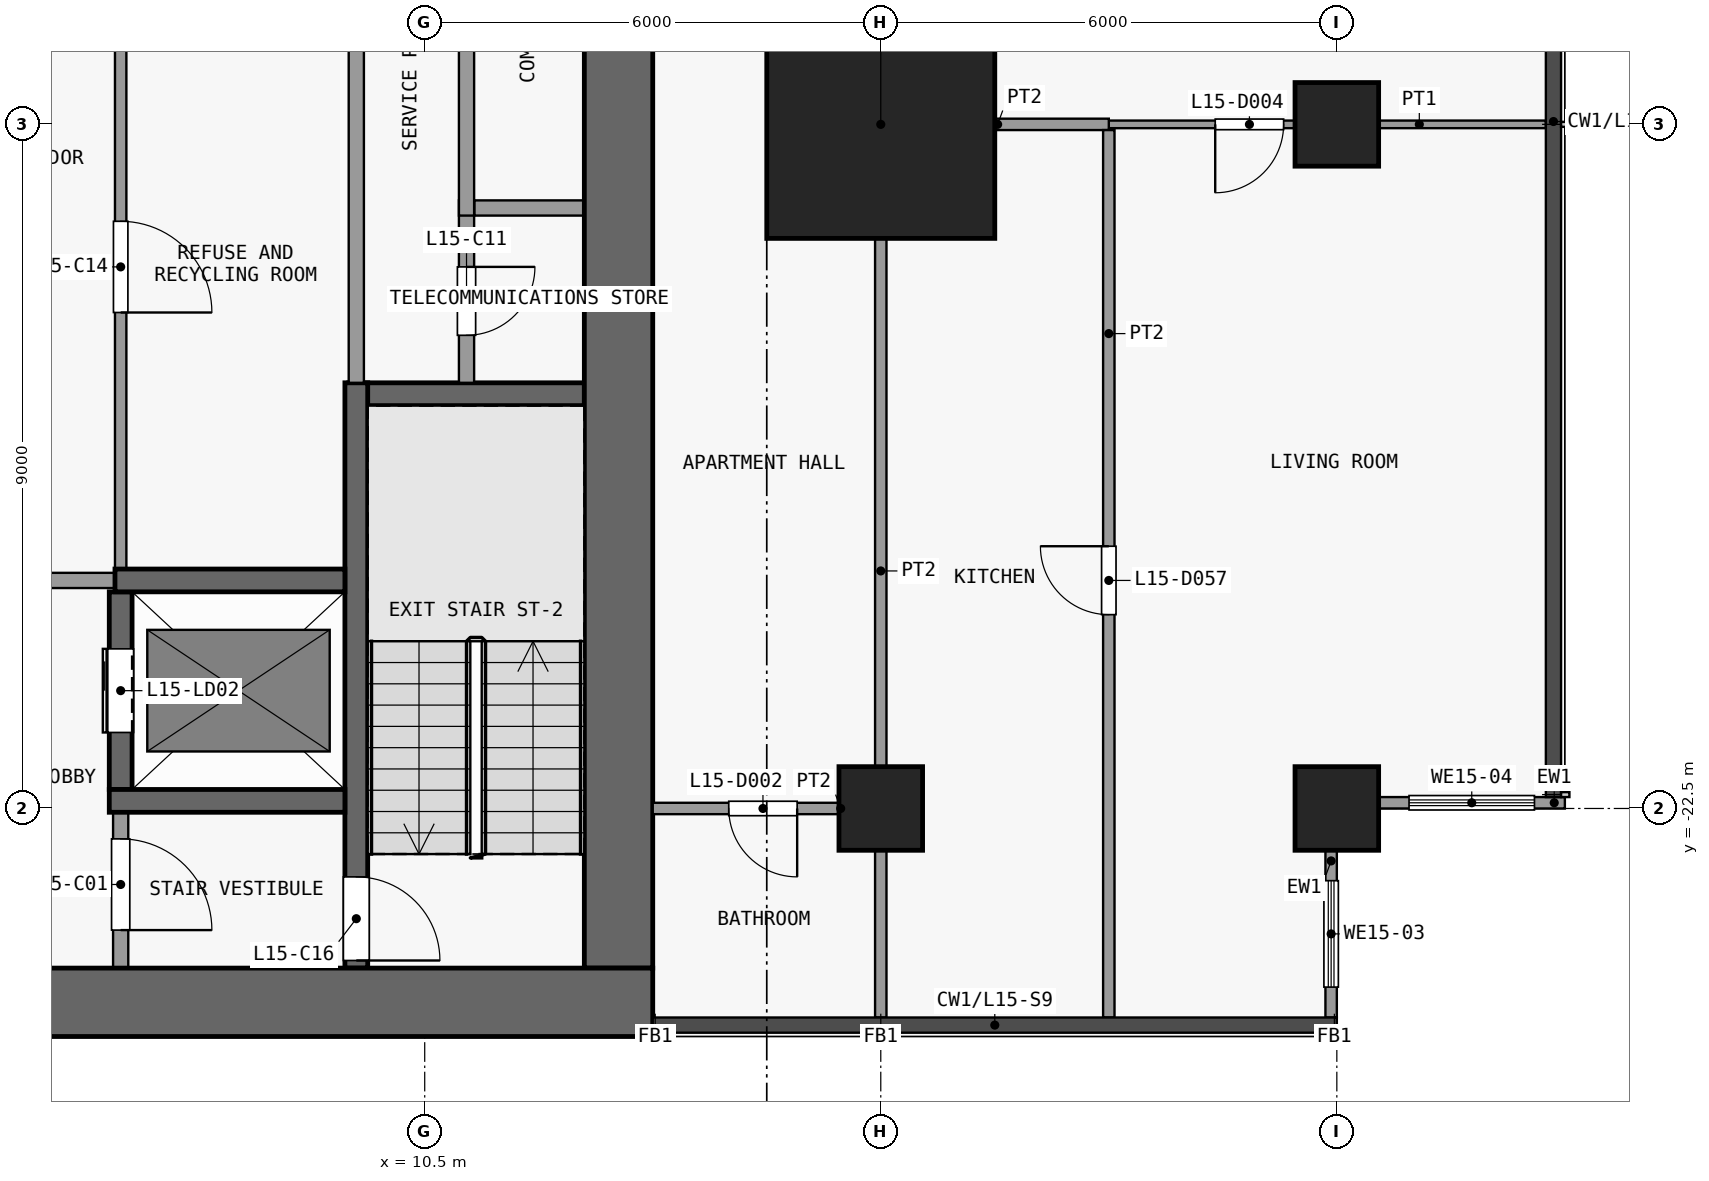
"""IFC4 building model, lengths in metres.
Left out: names, types, materials, properties, quantities, classifications, styles, units other than length and angle.
Written with IfcOpenShell. Run it as: python <this file> out.ifc"""

import sys

from ifc_helpers import new_model, si_unit, direction, frame, frame_2d, origin, origin_2d, place, context, subcontext, project, spatial, rectangle, extrude, element, fill, save


model = new_model("IFC4")
c1 = context("Model", 3, precision=1e-05, world=origin(), true_north=direction((0.0, 1.0)))
c2 = subcontext(c1, "Body", "Model", "MODEL_VIEW")
j1 = project(units=[si_unit("LENGTHUNIT", "METRE"), si_unit("PLANEANGLEUNIT", "RADIAN")], contexts=[c1])
p1 = place(None, origin())
s1 = spatial("IfcSite", under=j1, at=p1, CompositionType="ELEMENT")
p2 = place(p1, origin())
s2 = spatial("IfcBuilding", under=s1, at=p2, CompositionType="ELEMENT")
p3 = place(p2, frame((0.0, 0.0, 64.9)))
s3 = spatial("IfcBuildingStorey", under=s2, at=p3, CompositionType="ELEMENT", Elevation=64.9)
p4 = place(p3, frame((16.5, -22.5, 0.0), z_axis=(0.0, 0.0, 1.0), x_axis=(1.0, 0.0, 0.0)))
e1 = element("IfcColumn", 1, at=p4, inside=s3, PredefinedType="COLUMN", context=c2, shape_type="SweptSolid", body=[
    extrude(rectangle(XDim=1.1, YDim=1.1, at=origin_2d()), origin(), (0.0, 0.0, 1.0), 3.6),
])
p5 = place(p3, frame((16.5, -13.5, 0.0), z_axis=(0.0, 0.0, 1.0), x_axis=(1.0, 0.0, 0.0)))
e2 = element("IfcColumn", 2, at=p5, inside=s3, PredefinedType="COLUMN", context=c2, shape_type="SweptSolid", body=[
    extrude(rectangle(XDim=3.0, YDim=3.0, at=origin_2d()), origin(), (0.0, 0.0, 1.0), 3.6),
])
for number, where, z_axis, x_axis in (
    (3, (22.5, -22.5, 0.0), (0.0, 0.0, 1.0), (1.0, 0.0, 0.0)),
    (4, (22.5, -13.5, 0.0), (0.0, 0.0, 1.0), (1.0, 0.0, 0.0)),
):
    element("IfcColumn", number, at=place(p3, frame(where, z_axis=z_axis, x_axis=x_axis)), inside=s3, PredefinedType="COLUMN", context=c2, shape_type="SweptSolid", body=[
        extrude(rectangle(XDim=1.1, YDim=1.1, at=origin_2d()), origin(), (0.0, 0.0, 1.0), 3.6),
    ])
p6 = place(p3, frame((-13.5, -25.05, 0.0), z_axis=(0.0, 0.0, 1.0), x_axis=(1.0, 0.0, 0.0)))
e5 = element("IfcWall", 5, at=p6, inside=s3, PredefinedType="SHEAR", context=c2, shape_type="SweptSolid", body=[
    extrude(rectangle(XDim=27.0, YDim=0.9, at=frame_2d((13.5, 0.0))), origin(), (0.0, 0.0, 1.0), 3.3),
])
p7 = place(p3, frame((13.05, -24.6, 0.0), z_axis=(0.0, 0.0, 1.0), x_axis=(0.0, 1.0, 0.0)))
e6 = element("IfcWall", 6, at=p7, inside=s3, PredefinedType="SHEAR", context=c2, shape_type="SweptSolid", body=[
    extrude(rectangle(XDim=16.1, YDim=0.9, at=frame_2d((8.05, 0.0))), origin(), (0.0, 0.0, 1.0), 3.3),
])
p8 = place(p3, frame((6.35, -22.4, 0.0), z_axis=(0.0, 0.0, 1.0), x_axis=(1.0, 0.0, 0.0)))
e7 = element("IfcWall", 7, at=p8, inside=s3, PredefinedType="SHEAR", context=c2, shape_type="SweptSolid", body=[
    extrude(rectangle(XDim=3.1, YDim=0.3, at=frame_2d((1.55, 0.0))), origin(), (0.0, 0.0, 1.0), 3.3),
])
p9 = place(p3, frame((6.575, -19.5, 0.0), z_axis=(0.0, 0.0, 1.0), x_axis=(-1.0, 0.0, 0.0)))
e8 = element("IfcWall", 8, at=p9, inside=s3, PredefinedType="PARTITIONING", context=c2, shape_type="SweptSolid", body=[
    extrude(rectangle(XDim=3.55, YDim=0.2, at=frame_2d((1.775, 0.0))), origin(), (0.0, 0.0, 1.0), 3.3),
])
p10 = place(p9, frame((1.025, 0.0, 0.0)))
e9 = element("IfcOpeningElement", 9, at=p10, cuts=e8, PredefinedType="OPENING", context=c2, shape_type="SweptSolid", body=[
    extrude(rectangle(XDim=1.5, YDim=2.1, at=frame_2d((0.75, 1.05))), frame((0.0, 0.11, 0.0), z_axis=(0.0, -1.0, 0.0), x_axis=(1.0, 0.0, 0.0)), (0.0, 0.0, 1.0), 0.22),
])
p11 = place(p3, frame((6.425, -19.5, 0.0), z_axis=(0.0, 0.0, 1.0), x_axis=(1.0, 0.0, 0.0)))
e10 = element("IfcWall", 10, at=p11, inside=s3, PredefinedType="SHEAR", context=c2, shape_type="SweptSolid", body=[
    extrude(rectangle(XDim=3.025, YDim=0.3, at=frame_2d((1.512, 0.0))), origin(), (0.0, 0.0, 1.0), 3.3),
])
p12 = place(p3, frame((9.5, -17.05, 0.0), z_axis=(0.0, 0.0, 1.0), x_axis=(1.0, 0.0, 0.0)))
e11 = element("IfcWall", 11, at=p12, inside=s3, PredefinedType="SHEAR", context=c2, shape_type="SweptSolid", body=[
    extrude(rectangle(XDim=3.1, YDim=0.3, at=frame_2d((1.55, 0.0))), origin(), (0.0, 0.0, 1.0), 3.3),
])
p13 = place(p3, frame((11.15, -14.6, 0.0), z_axis=(0.0, 0.0, 1.0), x_axis=(1.0, 0.0, 0.0)))
e12 = element("IfcWall", 12, at=p13, inside=s3, PredefinedType="PARTITIONING", context=c2, shape_type="SweptSolid", body=[
    extrude(rectangle(XDim=1.45, YDim=0.2, at=frame_2d((0.725, 0.0))), origin(), (0.0, 0.0, 1.0), 3.3),
])
p14 = place(p3, frame((6.5, -22.55, 0.0), z_axis=(0.0, 0.0, 1.0), x_axis=(0.0, -1.0, 0.0)))
e13 = element("IfcWall", 13, at=p14, inside=s3, PredefinedType="PARTITIONING", context=c2, shape_type="SweptSolid", body=[
    extrude(rectangle(XDim=2.05, YDim=0.2, at=frame_2d((1.025, 0.0))), origin(), (0.0, 0.0, 1.0), 3.3),
])
p15 = place(p14, frame((0.35, 0.0, 0.0)))
e14 = element("IfcOpeningElement", 14, at=p15, cuts=e13, PredefinedType="OPENING", context=c2, shape_type="SweptSolid", body=[
    extrude(rectangle(XDim=1.2, YDim=2.1, at=frame_2d((0.6, 1.05))), frame((0.0, 0.11, 0.0), z_axis=(0.0, -1.0, 0.0), x_axis=(1.0, 0.0, 0.0)), (0.0, 0.0, 1.0), 0.22),
])
p16 = place(p3, frame((6.5, -22.25, 0.0), z_axis=(0.0, 0.0, 1.0), x_axis=(0.0, 1.0, 0.0)))
e15 = element("IfcWall", 15, at=p16, inside=s3, PredefinedType="SHEAR", context=c2, shape_type="SweptSolid", body=[
    extrude(rectangle(XDim=2.6, YDim=0.3, at=frame_2d((1.3, 0.0))), origin(), (0.0, 0.0, 1.0), 3.3),
])
p17 = place(p16, frame((0.75, 0.0, 0.0)))
e16 = element("IfcOpeningElement", 16, at=p17, cuts=e15, PredefinedType="OPENING", context=c2, shape_type="SweptSolid", body=[
    extrude(rectangle(XDim=1.1, YDim=2.1, at=frame_2d((0.55, 1.05))), frame((0.0, 0.16, 0.0), z_axis=(0.0, -1.0, 0.0), x_axis=(1.0, 0.0, 0.0)), (0.0, 0.0, 1.0), 0.32),
])
p18 = place(p3, frame((6.5, -11.35, 0.0), z_axis=(0.0, 0.0, 1.0), x_axis=(0.0, -1.0, 0.0)))
e17 = element("IfcWall", 17, at=p18, inside=s3, PredefinedType="PARTITIONING", context=c2, shape_type="SweptSolid", body=[
    extrude(rectangle(XDim=8.0, YDim=0.15, at=frame_2d((4.0, 0.0))), origin(), (0.0, 0.0, 1.0), 3.3),
])
p19 = place(p18, frame((3.425, 0.0, 0.0)))
e18 = element("IfcOpeningElement", 18, at=p19, cuts=e17, PredefinedType="OPENING", context=c2, shape_type="SweptSolid", body=[
    extrude(rectangle(XDim=1.2, YDim=2.1, at=frame_2d((0.6, 1.05))), frame((0.0, 0.085, 0.0), z_axis=(0.0, -1.0, 0.0), x_axis=(1.0, 0.0, 0.0)), (0.0, 0.0, 1.0), 0.17),
])
p20 = place(p3, frame((9.6, -16.9, 0.0), z_axis=(0.0, 0.0, 1.0), x_axis=(0.0, -1.0, 0.0)))
e19 = element("IfcWall", 19, at=p20, inside=s3, PredefinedType="SHEAR", context=c2, shape_type="SweptSolid", body=[
    extrude(rectangle(XDim=7.7, YDim=0.3, at=frame_2d((3.85, 0.0))), origin(), (0.0, 0.0, 1.0), 3.3),
])
p21 = place(p20, frame((6.5, 0.0, 0.0)))
e20 = element("IfcOpeningElement", 20, at=p21, cuts=e19, PredefinedType="OPENING", context=c2, shape_type="SweptSolid", body=[
    extrude(rectangle(XDim=1.1, YDim=2.1, at=frame_2d((0.55, 1.05))), frame((0.0, 0.16, 0.0), z_axis=(0.0, -1.0, 0.0), x_axis=(1.0, 0.0, 0.0)), (0.0, 0.0, 1.0), 0.32),
])
p22 = place(p3, frame((9.6, -16.9, 0.0), z_axis=(0.0, 0.0, 1.0), x_axis=(0.0, 1.0, 0.0)))
e21 = element("IfcWall", 21, at=p22, inside=s3, PredefinedType="PARTITIONING", context=c2, shape_type="SweptSolid", body=[
    extrude(rectangle(XDim=5.75, YDim=0.2, at=frame_2d((2.875, 0.0))), origin(), (0.0, 0.0, 1.0), 3.3),
])
p23 = place(p3, frame((11.05, -14.5, 0.0), z_axis=(0.0, 0.0, 1.0), x_axis=(0.0, -1.0, 0.0)))
e22 = element("IfcWall", 22, at=p23, inside=s3, PredefinedType="PARTITIONING", context=c2, shape_type="SweptSolid", body=[
    extrude(rectangle(XDim=2.4, YDim=0.2, at=frame_2d((1.2, 0.0))), origin(), (0.0, 0.0, 1.0), 3.3),
])
p24 = place(p23, frame((0.875, 0.0, 0.0)))
e23 = element("IfcOpeningElement", 23, at=p24, cuts=e22, PredefinedType="OPENING", context=c2, shape_type="SweptSolid", body=[
    extrude(rectangle(XDim=0.9, YDim=2.1, at=frame_2d((0.45, 1.05))), frame((0.0, 0.11, 0.0), z_axis=(0.0, -1.0, 0.0), x_axis=(1.0, 0.0, 0.0)), (0.0, 0.0, 1.0), 0.22),
])
p25 = place(p3, frame((11.05, -8.5, 0.0), z_axis=(0.0, 0.0, 1.0), x_axis=(0.0, -1.0, 0.0)))
e24 = element("IfcWall", 24, at=p25, inside=s3, PredefinedType="PARTITIONING", context=c2, shape_type="SweptSolid", body=[
    extrude(rectangle(XDim=6.2, YDim=0.2, at=frame_2d((3.1, 0.0))), origin(), (0.0, 0.0, 1.0), 3.3),
])
p26 = place(p25, frame((2.6, 0.0, 0.0)))
e25 = element("IfcOpeningElement", 25, at=p26, cuts=e24, PredefinedType="OPENING", context=c2, shape_type="SweptSolid", body=[
    extrude(rectangle(XDim=0.9, YDim=2.1, at=frame_2d((0.45, 1.05))), frame((0.0, 0.11, 0.0), z_axis=(0.0, -1.0, 0.0), x_axis=(1.0, 0.0, 0.0)), (0.0, 0.0, 1.0), 0.22),
])
p27 = place(p3, frame((22.425, -23.05, 0.0), z_axis=(0.0, 0.0, 1.0), x_axis=(0.0, -1.0, 0.0)))
e26 = element("IfcWall", 26, at=p27, inside=s3, PredefinedType="SOLIDWALL", context=c2, shape_type="SweptSolid", body=[
    extrude(rectangle(XDim=2.2, YDim=0.15, at=frame_2d((1.1, 0.0))), origin(), (0.0, 0.0, 1.0), 3.3),
])
p28 = place(p27, frame((0.4, 0.0, 0.9)))
e27 = element("IfcOpeningElement", 27, at=p28, cuts=e26, PredefinedType="OPENING", context=c2, shape_type="SweptSolid", body=[
    extrude(rectangle(XDim=1.4, YDim=2.4, at=frame_2d((0.7, 1.2))), frame((0.0, 0.085, 0.0), z_axis=(0.0, -1.0, 0.0), x_axis=(1.0, 0.0, 0.0)), (0.0, 0.0, 1.0), 0.17),
])
p29 = place(p3, frame((25.5, -22.425, 0.0), z_axis=(0.0, 0.0, 1.0), x_axis=(-1.0, 0.0, 0.0)))
e28 = element("IfcWall", 28, at=p29, inside=s3, PredefinedType="SOLIDWALL", context=c2, shape_type="SweptSolid", body=[
    extrude(rectangle(XDim=2.45, YDim=0.15, at=frame_2d((1.225, 0.0))), origin(), (0.0, 0.0, 1.0), 3.3),
])
p30 = place(p29, frame((0.4, 0.0, 0.9)))
e29 = element("IfcOpeningElement", 29, at=p30, cuts=e28, PredefinedType="OPENING", context=c2, shape_type="SweptSolid", body=[
    extrude(rectangle(XDim=1.65, YDim=2.4, at=frame_2d((0.825, 1.2))), frame((0.0, 0.085, 0.0), z_axis=(0.0, -1.0, 0.0), x_axis=(1.0, 0.0, 0.0)), (0.0, 0.0, 1.0), 0.17),
])
p31 = place(p3, frame((13.5, -22.5, 0.0), z_axis=(0.0, 0.0, 1.0), x_axis=(1.0, 0.0, 0.0)))
e30 = element("IfcWall", 30, at=p31, inside=s3, PredefinedType="PARTITIONING", context=c2, shape_type="SweptSolid", body=[
    extrude(rectangle(XDim=2.925, YDim=0.15, at=frame_2d((1.462, 0.0))), origin(), (0.0, 0.0, 1.0), 3.3),
])
p32 = place(p31, frame((1.0, 0.0, 0.0)))
e31 = element("IfcOpeningElement", 31, at=p32, cuts=e30, PredefinedType="OPENING", context=c2, shape_type="SweptSolid", body=[
    extrude(rectangle(XDim=0.9, YDim=2.1, at=frame_2d((0.45, 1.05))), frame((0.0, 0.085, 0.0), z_axis=(0.0, -1.0, 0.0), x_axis=(1.0, 0.0, 0.0)), (0.0, 0.0, 1.0), 0.17),
])
p33 = place(p3, frame((19.5, -13.5, 0.0), z_axis=(0.0, 0.0, 1.0), x_axis=(1.0, 0.0, 0.0)))
e32 = element("IfcWall", 32, at=p33, inside=s3, PredefinedType="PARTITIONING", context=c2, shape_type="SweptSolid", body=[
    extrude(rectangle(XDim=5.75, YDim=0.1, at=frame_2d((2.875, 0.0))), origin(), (0.0, 0.0, 1.0), 3.3),
])
p34 = place(p33, frame((1.4, 0.0, 0.0)))
e33 = element("IfcOpeningElement", 33, at=p34, cuts=e32, PredefinedType="OPENING", context=c2, shape_type="SweptSolid", body=[
    extrude(rectangle(XDim=0.9, YDim=2.1, at=frame_2d((0.45, 1.05))), frame((0.0, 0.06, 0.0), z_axis=(0.0, -1.0, 0.0), x_axis=(1.0, 0.0, 0.0)), (0.0, 0.0, 1.0), 0.12),
])
p35 = place(p3, frame((16.575, -13.5, 0.0), z_axis=(0.0, 0.0, 1.0), x_axis=(1.0, 0.0, 0.0)))
e34 = element("IfcWall", 34, at=p35, inside=s3, PredefinedType="PARTITIONING", context=c2, shape_type="SweptSolid", body=[
    extrude(rectangle(XDim=2.925, YDim=0.15, at=frame_2d((1.462, 0.0))), origin(), (0.0, 0.0, 1.0), 3.3),
])
p36 = place(p3, frame((16.5, -13.5, 0.0), z_axis=(0.0, 0.0, 1.0), x_axis=(0.0, 1.0, 0.0)))
e35 = element("IfcWall", 35, at=p36, inside=s3, PredefinedType="PARTITIONING", context=c2, shape_type="SweptSolid", body=[
    extrude(rectangle(XDim=5.5, YDim=0.1, at=frame_2d((2.75, 0.0))), origin(), (0.0, 0.0, 1.0), 3.3),
])
p37 = place(p36, frame((2.3, 0.0, 0.0)))
e36 = element("IfcOpeningElement", 36, at=p37, cuts=e35, PredefinedType="OPENING", context=c2, shape_type="SweptSolid", body=[
    extrude(rectangle(XDim=0.9, YDim=2.1, at=frame_2d((0.45, 1.05))), frame((0.0, 0.06, 0.0), z_axis=(0.0, -1.0, 0.0), x_axis=(1.0, 0.0, 0.0)), (0.0, 0.0, 1.0), 0.12),
])
p38 = place(p3, frame((16.5, -25.25, 0.0), z_axis=(0.0, 0.0, 1.0), x_axis=(0.0, 1.0, 0.0)))
e37 = element("IfcWall", 37, at=p38, inside=s3, PredefinedType="PARTITIONING", context=c2, shape_type="SweptSolid", body=[
    extrude(rectangle(XDim=11.75, YDim=0.15, at=frame_2d((5.875, 0.0))), origin(), (0.0, 0.0, 1.0), 3.3),
])
p39 = place(p3, frame((19.5, -25.25, 0.0), z_axis=(0.0, 0.0, 1.0), x_axis=(0.0, 1.0, 0.0)))
e38 = element("IfcWall", 38, at=p39, inside=s3, PredefinedType="PARTITIONING", context=c2, shape_type="SweptSolid", body=[
    extrude(rectangle(XDim=11.675, YDim=0.15, at=frame_2d((5.837, 0.0))), origin(), (0.0, 0.0, 1.0), 3.3),
])
p40 = place(p39, frame((5.3, 0.0, 0.0)))
e39 = element("IfcOpeningElement", 39, at=p40, cuts=e38, PredefinedType="OPENING", context=c2, shape_type="SweptSolid", body=[
    extrude(rectangle(XDim=0.9, YDim=2.1, at=frame_2d((0.45, 1.05))), frame((0.0, 0.085, 0.0), z_axis=(0.0, -1.0, 0.0), x_axis=(1.0, 0.0, 0.0)), (0.0, 0.0, 1.0), 0.17),
])
p41 = place(p17, origin())
e40 = element("IfcDoor", 40, at=p41, inside=s3, OperationType="DOUBLE_DOOR_SLIDING", PredefinedType="DOOR", context=c2, shape_type="SweptSolid", body=[
    extrude(rectangle(XDim=1.1, YDim=2.1, at=frame_2d((0.55, 1.05))), frame((0.0, 0.025, 0.0), z_axis=(0.0, -1.0, 0.0), x_axis=(1.0, 0.0, 0.0)), (0.0, 0.0, 1.0), 0.05),
])
fill(e16, e40)
p42 = place(p15, origin())
e41 = element("IfcDoor", 41, at=p42, inside=s3, OperationType="SINGLE_SWING_RIGHT", PredefinedType="DOOR", context=c2, shape_type="SweptSolid", body=[
    extrude(rectangle(XDim=1.2, YDim=2.1, at=frame_2d((0.6, 1.05))), frame((0.0, 0.025, 0.0), z_axis=(0.0, -1.0, 0.0), x_axis=(1.0, 0.0, 0.0)), (0.0, 0.0, 1.0), 0.05),
])
fill(e14, e41)
p43 = place(p24, origin())
e42 = element("IfcDoor", 42, at=p43, inside=s3, OperationType="SINGLE_SWING_LEFT", PredefinedType="DOOR", context=c2, shape_type="SweptSolid", body=[
    extrude(rectangle(XDim=0.9, YDim=2.1, at=frame_2d((0.45, 1.05))), frame((0.0, 0.025, 0.0), z_axis=(0.0, -1.0, 0.0), x_axis=(1.0, 0.0, 0.0)), (0.0, 0.0, 1.0), 0.05),
])
fill(e23, e42)
p44 = place(p19, origin())
e43 = element("IfcDoor", 43, at=p44, inside=s3, OperationType="SINGLE_SWING_RIGHT", PredefinedType="DOOR", context=c2, shape_type="SweptSolid", body=[
    extrude(rectangle(XDim=1.2, YDim=2.1, at=frame_2d((0.6, 1.05))), frame((0.0, 0.025, 0.0), z_axis=(0.0, -1.0, 0.0), x_axis=(1.0, 0.0, 0.0)), (0.0, 0.0, 1.0), 0.05),
])
fill(e18, e43)
p45 = place(p21, origin())
e44 = element("IfcDoor", 44, at=p45, inside=s3, OperationType="SINGLE_SWING_RIGHT", PredefinedType="DOOR", context=c2, shape_type="SweptSolid", body=[
    extrude(rectangle(XDim=1.1, YDim=2.1, at=frame_2d((0.55, 1.05))), frame((0.0, 0.025, 0.0), z_axis=(0.0, -1.0, 0.0), x_axis=(1.0, 0.0, 0.0)), (0.0, 0.0, 1.0), 0.05),
])
fill(e20, e44)
p46 = place(p28, origin())
e45 = element("IfcWindow", 45, at=p46, inside=s3, PartitioningType="SINGLE_PANEL", PredefinedType="WINDOW", context=c2, shape_type="SweptSolid", body=[
    extrude(rectangle(XDim=1.4, YDim=2.4, at=frame_2d((0.7, 1.2))), frame((0.0, 0.03, 0.0), z_axis=(0.0, -1.0, 0.0), x_axis=(1.0, 0.0, 0.0)), (0.0, 0.0, 1.0), 0.06),
])
fill(e27, e45)
p47 = place(p30, origin())
e46 = element("IfcWindow", 46, at=p47, inside=s3, PartitioningType="SINGLE_PANEL", PredefinedType="WINDOW", context=c2, shape_type="SweptSolid", body=[
    extrude(rectangle(XDim=1.65, YDim=2.4, at=frame_2d((0.825, 1.2))), frame((0.0, 0.03, 0.0), z_axis=(0.0, -1.0, 0.0), x_axis=(1.0, 0.0, 0.0)), (0.0, 0.0, 1.0), 0.06),
])
fill(e29, e46)
p48 = place(p32, origin())
e47 = element("IfcDoor", 47, at=p48, inside=s3, OperationType="SINGLE_SWING_RIGHT", PredefinedType="DOOR", context=c2, shape_type="SweptSolid", body=[
    extrude(rectangle(XDim=0.9, YDim=2.1, at=frame_2d((0.45, 1.05))), frame((0.0, 0.025, 0.0), z_axis=(0.0, -1.0, 0.0), x_axis=(1.0, 0.0, 0.0)), (0.0, 0.0, 1.0), 0.05),
])
fill(e31, e47)
p49 = place(p34, origin())
e48 = element("IfcDoor", 48, at=p49, inside=s3, OperationType="SINGLE_SWING_LEFT", PredefinedType="DOOR", context=c2, shape_type="SweptSolid", body=[
    extrude(rectangle(XDim=0.9, YDim=2.1, at=frame_2d((0.45, 1.05))), frame((0.0, 0.025, 0.0), z_axis=(0.0, -1.0, 0.0), x_axis=(1.0, 0.0, 0.0)), (0.0, 0.0, 1.0), 0.05),
])
fill(e33, e48)
p50 = place(p40, origin())
e49 = element("IfcDoor", 49, at=p50, inside=s3, OperationType="SINGLE_SWING_LEFT", PredefinedType="DOOR", context=c2, shape_type="SweptSolid", body=[
    extrude(rectangle(XDim=0.9, YDim=2.1, at=frame_2d((0.45, 1.05))), frame((0.0, 0.025, 0.0), z_axis=(0.0, -1.0, 0.0), x_axis=(1.0, 0.0, 0.0)), (0.0, 0.0, 1.0), 0.05),
])
fill(e39, e49)
save(model, sys.argv[1])
